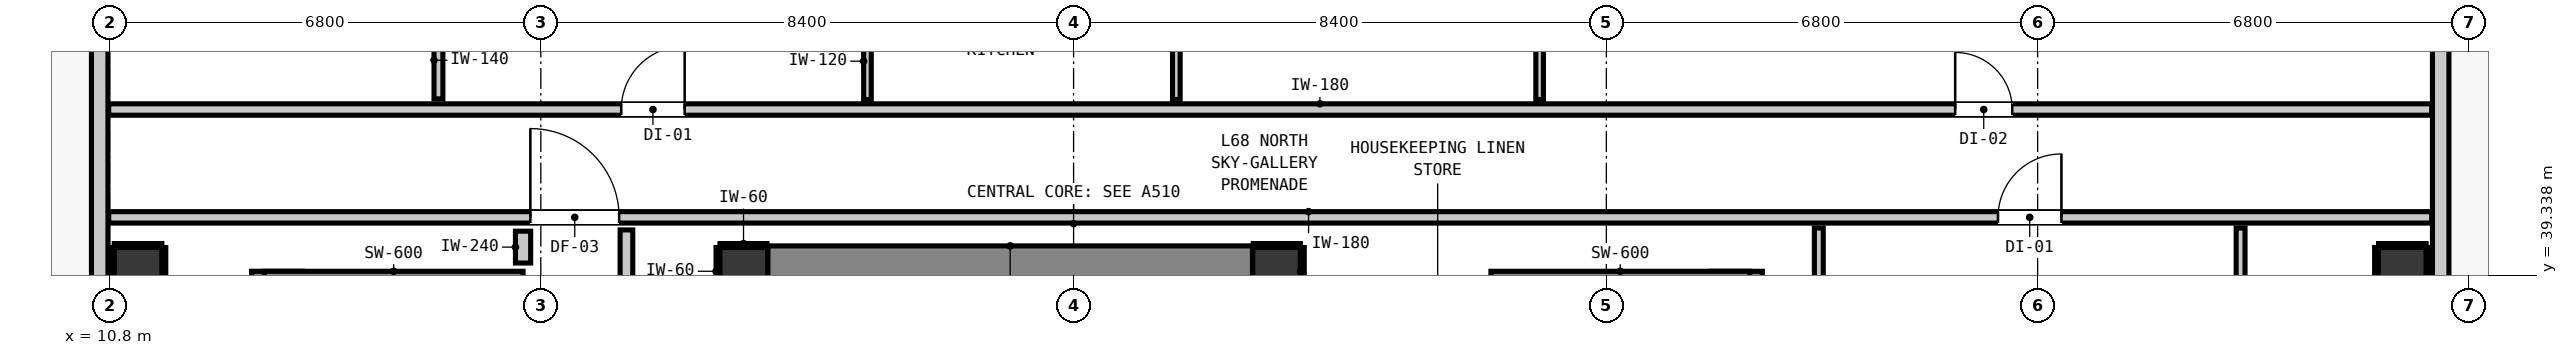
"""IFC4 building model, lengths in metres.
Left out: names, types, materials, properties, quantities, classifications, styles, units other than length and angle.
Written with IfcOpenShell. Run it as: python <this file> out.ifc"""

import sys

from ifc_helpers import new_model, si_unit, direction, frame, frame_2d, origin, origin_2d, place, context, subcontext, project, spatial, rectangle, extrude, element, fill, save


model = new_model("IFC4")
c1 = context("Model", 3, precision=1e-05, world=origin(), true_north=direction((0.0, 1.0)))
c2 = subcontext(c1, "Body", "Model", "MODEL_VIEW")
j1 = project(units=[si_unit("LENGTHUNIT", "METRE"), si_unit("PLANEANGLEUNIT", "RADIAN")], contexts=[c1])
p1 = place(None, origin())
s1 = spatial("IfcSite", under=j1, at=p1, CompositionType="ELEMENT")
p2 = place(p1, origin())
s2 = spatial("IfcBuilding", under=s1, at=p2, CompositionType="ELEMENT")
p3 = place(p2, frame((0.0, 0.0, 234.6)))
s3 = spatial("IfcBuildingStorey", under=s2, at=p3, CompositionType="ELEMENT", Elevation=234.6)
for number, where, z_axis, x_axis in (
    (1, (20.8, 39.4, 0.0), (0.0, 0.0, 1.0), (1.0, 0.0, 0.0)),
    (2, (29.2, 39.4, 0.0), (0.0, 0.0, 1.0), (1.0, 0.0, 0.0)),
):
    element("IfcColumn", number, at=place(p3, frame(where, z_axis=z_axis, x_axis=x_axis)), inside=s3, PredefinedType="COLUMN", context=c2, shape_type="SweptSolid", body=[
        extrude(rectangle(XDim=0.75, YDim=0.75, at=origin_2d()), origin(), (0.0, 0.0, 1.0), 3.32),
    ])
p4 = place(p3, frame((13.44, 31.08, 0.0), z_axis=(0.0, 0.0, 1.0), x_axis=(0.0, 1.0, 0.0)))
e3 = element("IfcWall", 3, at=p4, inside=s3, PredefinedType="SHEAR", context=c2, shape_type="SweptSolid", body=[
    extrude(rectangle(XDim=8.32, YDim=0.8, at=frame_2d((4.16, 0.0))), origin(), (0.0, 0.0, 1.0), 3.32),
])
p5 = place(p3, frame((13.24, 39.1, 0.0), z_axis=(0.0, 0.0, 1.0), x_axis=(1.0, 0.0, 0.0)))
e4 = element("IfcWall", 4, at=p5, inside=s3, PredefinedType="SHEAR", context=c2, shape_type="SweptSolid", body=[
    extrude(rectangle(XDim=4.08, YDim=0.6, at=frame_2d((2.04, 0.0))), origin(), (0.0, 0.0, 1.0), 3.32),
])
p6 = place(p3, frame((36.46, 31.08, 0.0), z_axis=(0.0, 0.0, 1.0), x_axis=(0.0, 1.0, 0.0)))
e5 = element("IfcWall", 5, at=p6, inside=s3, PredefinedType="SHEAR", context=c2, shape_type="SweptSolid", body=[
    extrude(rectangle(XDim=8.32, YDim=0.8, at=frame_2d((4.16, 0.0))), origin(), (0.0, 0.0, 1.0), 3.32),
])
p7 = place(p3, frame((32.58, 39.1, 0.0), z_axis=(0.0, 0.0, 1.0), x_axis=(1.0, 0.0, 0.0)))
e6 = element("IfcWall", 6, at=p7, inside=s3, PredefinedType="SHEAR", context=c2, shape_type="SweptSolid", body=[
    extrude(rectangle(XDim=4.08, YDim=0.6, at=frame_2d((2.04, 0.0))), origin(), (0.0, 0.0, 1.0), 3.32),
])
p8 = place(p3, frame((21.18, 39.4, 0.0), z_axis=(0.0, 0.0, 1.0), x_axis=(1.0, 0.0, 0.0)))
e7 = element("IfcWall", 7, at=p8, inside=s3, PredefinedType="SHEAR", context=c2, shape_type="SweptSolid", body=[
    extrude(rectangle(XDim=7.64, YDim=0.8, at=frame_2d((3.82, 0.0))), origin(), (0.0, 0.0, 1.0), 3.32),
])
for number, where, z_axis, x_axis in (
    (8, (11.25, 39.4, 0.0), (0.0, 0.0, 1.0), (1.0, 0.0, 0.0)),
    (9, (46.95, 39.4, 0.0), (0.0, 0.0, 1.0), (1.0, 0.0, 0.0)),
):
    element("IfcColumn", number, at=place(p3, frame(where, z_axis=z_axis, x_axis=x_axis)), inside=s3, PredefinedType="COLUMN", context=c2, shape_type="SweptSolid", body=[
        extrude(rectangle(XDim=0.75, YDim=0.75, at=origin_2d()), origin(), (0.0, 0.0, 1.0), 3.32),
    ])
p9 = place(p3, frame((10.645, 18.545, 0.0), z_axis=(0.0, 0.0, 1.0), x_axis=(0.0, 1.0, 0.0)))
e10 = element("IfcWall", 10, at=p9, inside=s3, PredefinedType="STANDARD", context=c2, shape_type="SweptSolid", body=[
    extrude(rectangle(XDim=30.31, YDim=0.26, at=frame_2d((15.155, 0.0))), origin(), (0.0, 0.0, 1.0), 3.1),
])
p10 = place(p9, frame((27.695, 0.0, 0.0)))
e11 = element("IfcOpeningElement", 11, at=p10, cuts=e10, PredefinedType="OPENING", context=c2, shape_type="SweptSolid", body=[
    extrude(rectangle(XDim=1.0, YDim=2.15, at=frame_2d((0.5, 1.075))), frame((0.0, 0.14, 0.0), z_axis=(0.0, -1.0, 0.0), x_axis=(1.0, 0.0, 0.0)), (0.0, 0.0, 1.0), 0.28),
])
p11 = place(p9, frame((29.108, 0.0, 0.85)))
e12 = element("IfcOpeningElement", 12, at=p11, cuts=e10, PredefinedType="OPENING", context=c2, shape_type="SweptSolid", body=[
    extrude(rectangle(XDim=0.9, YDim=1.5, at=frame_2d((0.45, 0.75))), frame((0.0, 0.14, 0.0), z_axis=(0.0, -1.0, 0.0), x_axis=(1.0, 0.0, 0.0)), (0.0, 0.0, 1.0), 0.28),
])
p12 = place(p3, frame((47.555, 48.855, 0.0), z_axis=(0.0, 0.0, 1.0), x_axis=(0.0, -1.0, 0.0)))
e13 = element("IfcWall", 13, at=p12, inside=s3, PredefinedType="STANDARD", context=c2, shape_type="SweptSolid", body=[
    extrude(rectangle(XDim=30.31, YDim=0.26, at=frame_2d((15.155, 0.0))), origin(), (0.0, 0.0, 1.0), 3.1),
])
p13 = place(p12, frame((0.91, 0.0, 0.0)))
e14 = element("IfcOpeningElement", 14, at=p13, cuts=e13, PredefinedType="OPENING", context=c2, shape_type="SweptSolid", body=[
    extrude(rectangle(XDim=1.0, YDim=2.15, at=frame_2d((0.5, 1.075))), frame((0.0, 0.14, 0.0), z_axis=(0.0, -1.0, 0.0), x_axis=(1.0, 0.0, 0.0)), (0.0, 0.0, 1.0), 0.28),
])
p14 = place(p12, frame((3.782, 0.0, 0.85)))
e15 = element("IfcOpeningElement", 15, at=p14, cuts=e13, PredefinedType="OPENING", context=c2, shape_type="SweptSolid", body=[
    extrude(rectangle(XDim=1.35, YDim=1.85, at=frame_2d((0.675, 0.925))), frame((0.0, 0.14, 0.0), z_axis=(0.0, -1.0, 0.0), x_axis=(1.0, 0.0, 0.0)), (0.0, 0.0, 1.0), 0.28),
])
p15 = place(p3, frame((10.787, 40.25, 0.0), z_axis=(0.0, 0.0, 1.0), x_axis=(1.0, 0.0, 0.0)))
e16 = element("IfcWall", 16, at=p15, inside=s3, PredefinedType="PARTITIONING", context=c2, shape_type="SweptSolid", body=[
    extrude(rectangle(XDim=36.626, YDim=0.18, at=frame_2d((18.313, 0.0))), origin(), (0.0, 0.0, 1.0), 3.1),
])
p16 = place(p15, frame((6.648, 0.0, 0.0)))
e17 = element("IfcOpeningElement", 17, at=p16, cuts=e16, PredefinedType="OPENING", context=c2, shape_type="SweptSolid", body=[
    extrude(rectangle(XDim=1.4, YDim=2.15, at=frame_2d((0.7, 1.075))), frame((0.0, 0.1, 0.0), z_axis=(0.0, -1.0, 0.0), x_axis=(1.0, 0.0, 0.0)), (0.0, 0.0, 1.0), 0.2),
])
p17 = place(p15, frame((29.788, 0.0, 0.0)))
e18 = element("IfcOpeningElement", 18, at=p17, cuts=e16, PredefinedType="OPENING", context=c2, shape_type="SweptSolid", body=[
    extrude(rectangle(XDim=1.0, YDim=2.15, at=frame_2d((0.5, 1.075))), frame((0.0, 0.1, 0.0), z_axis=(0.0, -1.0, 0.0), x_axis=(1.0, 0.0, 0.0)), (0.0, 0.0, 1.0), 0.2),
])
p18 = place(p3, frame((10.787, 41.95, 0.0), z_axis=(0.0, 0.0, 1.0), x_axis=(1.0, 0.0, 0.0)))
e19 = element("IfcWall", 19, at=p18, inside=s3, PredefinedType="PARTITIONING", context=c2, shape_type="SweptSolid", body=[
    extrude(rectangle(XDim=36.626, YDim=0.18, at=frame_2d((18.313, 0.0))), origin(), (0.0, 0.0, 1.0), 3.1),
])
p19 = place(p18, frame((8.081, 0.0, 0.0)))
e20 = element("IfcOpeningElement", 20, at=p19, cuts=e19, PredefinedType="OPENING", context=c2, shape_type="SweptSolid", body=[
    extrude(rectangle(XDim=1.0, YDim=2.15, at=frame_2d((0.5, 1.075))), frame((0.0, 0.1, 0.0), z_axis=(0.0, -1.0, 0.0), x_axis=(1.0, 0.0, 0.0)), (0.0, 0.0, 1.0), 0.2),
])
p20 = place(p18, frame((29.113, 0.0, 0.0)))
e21 = element("IfcOpeningElement", 21, at=p20, cuts=e19, PredefinedType="OPENING", context=c2, shape_type="SweptSolid", body=[
    extrude(rectangle(XDim=0.9, YDim=2.1, at=frame_2d((0.45, 1.05))), frame((0.0, 0.1, 0.0), z_axis=(0.0, -1.0, 0.0), x_axis=(1.0, 0.0, 0.0)), (0.0, 0.0, 1.0), 0.2),
])
p21 = place(p3, frame((17.32, 39.53, 0.0), z_axis=(0.0, 0.0, 1.0), x_axis=(0.0, 1.0, 0.0)))
e22 = element("IfcWall", 22, at=p21, inside=s3, PredefinedType="PARTITIONING", context=c2, shape_type="SweptSolid", body=[
    extrude(rectangle(XDim=0.502, YDim=0.24, at=frame_2d((0.251, 0.0))), origin(), (0.0, 0.0, 1.0), 3.1),
])
p22 = place(p3, frame((18.95, 38.918, 0.0), z_axis=(0.0, 0.0, 1.0), x_axis=(0.0, 1.0, 0.0)))
e23 = element("IfcWall", 23, at=p22, inside=s3, PredefinedType="PARTITIONING", context=c2, shape_type="SweptSolid", body=[
    extrude(rectangle(XDim=1.134, YDim=0.2, at=frame_2d((0.567, 0.0))), origin(), (0.0, 0.0, 1.0), 3.1),
])
p23 = place(p3, frame((15.986, 42.118, 0.0), z_axis=(0.0, 0.0, 1.0), x_axis=(0.0, 1.0, 0.0)))
e24 = element("IfcWall", 24, at=p23, inside=s3, PredefinedType="PARTITIONING", context=c2, shape_type="SweptSolid", body=[
    extrude(rectangle(XDim=3.49, YDim=0.14, at=frame_2d((1.745, 0.0))), origin(), (0.0, 0.0, 1.0), 3.1),
])
p24 = place(p23, frame((1.318, 0.0, 0.0)))
e25 = element("IfcOpeningElement", 25, at=p24, cuts=e24, PredefinedType="OPENING", context=c2, shape_type="SweptSolid", body=[
    extrude(rectangle(XDim=0.86, YDim=2.02, at=frame_2d((0.43, 1.01))), frame((0.0, 0.08, 0.0), z_axis=(0.0, -1.0, 0.0), x_axis=(1.0, 0.0, 0.0)), (0.0, 0.0, 1.0), 0.16),
])
p25 = place(p3, frame((37.75, 30.848, 0.0), z_axis=(0.0, 0.0, 1.0), x_axis=(0.0, 1.0, 0.0)))
e26 = element("IfcWall", 26, at=p25, inside=s3, PredefinedType="PARTITIONING", context=c2, shape_type="SweptSolid", body=[
    extrude(rectangle(XDim=9.234, YDim=0.14, at=frame_2d((4.617, 0.0))), origin(), (0.0, 0.0, 1.0), 3.1),
])
p26 = place(p3, frame((44.4, 36.218, 0.0), z_axis=(0.0, 0.0, 1.0), x_axis=(0.0, 1.0, 0.0)))
e27 = element("IfcWall", 27, at=p26, inside=s3, PredefinedType="PARTITIONING", context=c2, shape_type="SweptSolid", body=[
    extrude(rectangle(XDim=3.864, YDim=0.14, at=frame_2d((1.932, 0.0))), origin(), (0.0, 0.0, 1.0), 3.1),
])
p27 = place(p26, frame((1.394, 0.0, 0.0)))
e28 = element("IfcOpeningElement", 28, at=p27, cuts=e27, PredefinedType="OPENING", context=c2, shape_type="SweptSolid", body=[
    extrude(rectangle(XDim=0.9, YDim=2.1, at=frame_2d((0.45, 1.05))), frame((0.0, 0.08, 0.0), z_axis=(0.0, -1.0, 0.0), x_axis=(1.0, 0.0, 0.0)), (0.0, 0.0, 1.0), 0.16),
])
p28 = place(p3, frame((22.75, 42.108, 0.0), z_axis=(0.0, 0.0, 1.0), x_axis=(0.0, 1.0, 0.0)))
e29 = element("IfcWall", 29, at=p28, inside=s3, PredefinedType="PARTITIONING", context=c2, shape_type="SweptSolid", body=[
    extrude(rectangle(XDim=3.51, YDim=0.12, at=frame_2d((1.755, 0.0))), origin(), (0.0, 0.0, 1.0), 3.1),
])
p29 = place(p28, frame((1.308, 0.0, 0.0)))
e30 = element("IfcOpeningElement", 30, at=p29, cuts=e29, PredefinedType="OPENING", context=c2, shape_type="SweptSolid", body=[
    extrude(rectangle(XDim=0.9, YDim=2.1, at=frame_2d((0.45, 1.05))), frame((0.0, 0.07, 0.0), z_axis=(0.0, -1.0, 0.0), x_axis=(1.0, 0.0, 0.0)), (0.0, 0.0, 1.0), 0.14),
])
p30 = place(p3, frame((27.62, 42.108, 0.0), z_axis=(0.0, 0.0, 1.0), x_axis=(0.0, 1.0, 0.0)))
e31 = element("IfcWall", 31, at=p30, inside=s3, PredefinedType="PARTITIONING", context=c2, shape_type="SweptSolid", body=[
    extrude(rectangle(XDim=3.51, YDim=0.12, at=frame_2d((1.755, 0.0))), origin(), (0.0, 0.0, 1.0), 3.1),
])
p31 = place(p30, frame((1.295, 0.0, 0.0)))
e32 = element("IfcOpeningElement", 32, at=p31, cuts=e31, PredefinedType="OPENING", context=c2, shape_type="SweptSolid", body=[
    extrude(rectangle(XDim=0.9, YDim=2.1, at=frame_2d((0.45, 1.05))), frame((0.0, 0.07, 0.0), z_axis=(0.0, -1.0, 0.0), x_axis=(1.0, 0.0, 0.0)), (0.0, 0.0, 1.0), 0.14),
])
p32 = place(p3, frame((33.348, 42.108, 0.0), z_axis=(0.0, 0.0, 1.0), x_axis=(0.0, 1.0, 0.0)))
e33 = element("IfcWall", 33, at=p32, inside=s3, PredefinedType="PARTITIONING", context=c2, shape_type="SweptSolid", body=[
    extrude(rectangle(XDim=3.51, YDim=0.12, at=frame_2d((1.755, 0.0))), origin(), (0.0, 0.0, 1.0), 3.1),
])
p33 = place(p3, frame((20.425, 39.807, 0.0), z_axis=(0.0, 0.0, 1.0), x_axis=(1.0, 0.0, 0.0)))
e34 = element("IfcWall", 34, at=p33, inside=s3, PredefinedType="PARTITIONING", context=c2, shape_type="SweptSolid", body=[
    extrude(rectangle(XDim=0.742, YDim=0.06, at=frame_2d((0.371, 0.0))), origin(), (0.0, 0.0, 1.0), 1.45),
])
p34 = place(p3, frame((20.393, 39.025, 0.0), z_axis=(0.0, 0.0, 1.0), x_axis=(0.0, 1.0, 0.0)))
e35 = element("IfcWall", 35, at=p34, inside=s3, PredefinedType="PARTITIONING", context=c2, shape_type="SweptSolid", body=[
    extrude(rectangle(XDim=0.75, YDim=0.06, at=frame_2d((0.375, 0.0))), origin(), (0.0, 0.0, 1.0), 1.45),
])
p35 = place(p3, frame((28.833, 39.807, 0.0), z_axis=(0.0, 0.0, 1.0), x_axis=(1.0, 0.0, 0.0)))
e36 = element("IfcWall", 36, at=p35, inside=s3, PredefinedType="PARTITIONING", context=c2, shape_type="SweptSolid", body=[
    extrude(rectangle(XDim=0.742, YDim=0.06, at=frame_2d((0.371, 0.0))), origin(), (0.0, 0.0, 1.0), 1.45),
])
for number, where, z_axis, x_axis in (
    (37, (29.607, 39.025, 0.0), (0.0, 0.0, 1.0), (0.0, 1.0, 0.0)),
    (38, (10.875, 39.807, 0.0), (0.0, 0.0, 1.0), (1.0, 0.0, 0.0)),
    (39, (10.843, 39.025, 0.0), (0.0, 0.0, 1.0), (0.0, 1.0, 0.0)),
    (40, (11.657, 39.025, 0.0), (0.0, 0.0, 1.0), (0.0, 1.0, 0.0)),
    (41, (46.575, 39.807, 0.0), (0.0, 0.0, 1.0), (1.0, 0.0, 0.0)),
    (42, (46.543, 39.025, 0.0), (0.0, 0.0, 1.0), (0.0, 1.0, 0.0)),
    (43, (47.357, 39.025, 0.0), (0.0, 0.0, 1.0), (0.0, 1.0, 0.0)),
):
    element("IfcWall", number, at=place(p3, frame(where, z_axis=z_axis, x_axis=x_axis)), inside=s3, PredefinedType="PARTITIONING", context=c2, shape_type="SweptSolid", body=[
        extrude(rectangle(XDim=0.75, YDim=0.06, at=frame_2d((0.375, 0.0))), origin(), (0.0, 0.0, 1.0), 1.45),
    ])
p36 = place(p16, origin())
e44 = element("IfcDoor", 44, at=p36, inside=s3, OperationType="SINGLE_SWING_LEFT", PredefinedType="DOOR", context=c2, shape_type="SweptSolid", body=[
    extrude(rectangle(XDim=1.4, YDim=2.15, at=frame_2d((0.7, 1.075))), frame((0.0, 0.025, 0.0), z_axis=(0.0, -1.0, 0.0), x_axis=(1.0, 0.0, 0.0)), (0.0, 0.0, 1.0), 0.05),
])
fill(e17, e44)
p37 = place(p19, origin())
e45 = element("IfcDoor", 45, at=p37, inside=s3, OperationType="SINGLE_SWING_RIGHT", PredefinedType="DOOR", context=c2, shape_type="SweptSolid", body=[
    extrude(rectangle(XDim=1.0, YDim=2.15, at=frame_2d((0.5, 1.075))), frame((0.0, 0.025, 0.0), z_axis=(0.0, -1.0, 0.0), x_axis=(1.0, 0.0, 0.0)), (0.0, 0.0, 1.0), 0.05),
])
fill(e20, e45)
p38 = place(p20, origin())
e46 = element("IfcDoor", 46, at=p38, inside=s3, OperationType="SINGLE_SWING_LEFT", PredefinedType="DOOR", context=c2, shape_type="SweptSolid", body=[
    extrude(rectangle(XDim=0.9, YDim=2.1, at=frame_2d((0.45, 1.05))), frame((0.0, 0.025, 0.0), z_axis=(0.0, -1.0, 0.0), x_axis=(1.0, 0.0, 0.0)), (0.0, 0.0, 1.0), 0.05),
])
fill(e21, e46)
p39 = place(p17, origin())
e47 = element("IfcDoor", 47, at=p39, inside=s3, OperationType="SINGLE_SWING_RIGHT", PredefinedType="DOOR", context=c2, shape_type="SweptSolid", body=[
    extrude(rectangle(XDim=1.0, YDim=2.15, at=frame_2d((0.5, 1.075))), frame((0.0, 0.025, 0.0), z_axis=(0.0, -1.0, 0.0), x_axis=(1.0, 0.0, 0.0)), (0.0, 0.0, 1.0), 0.05),
])
fill(e18, e47)
save(model, sys.argv[1])
